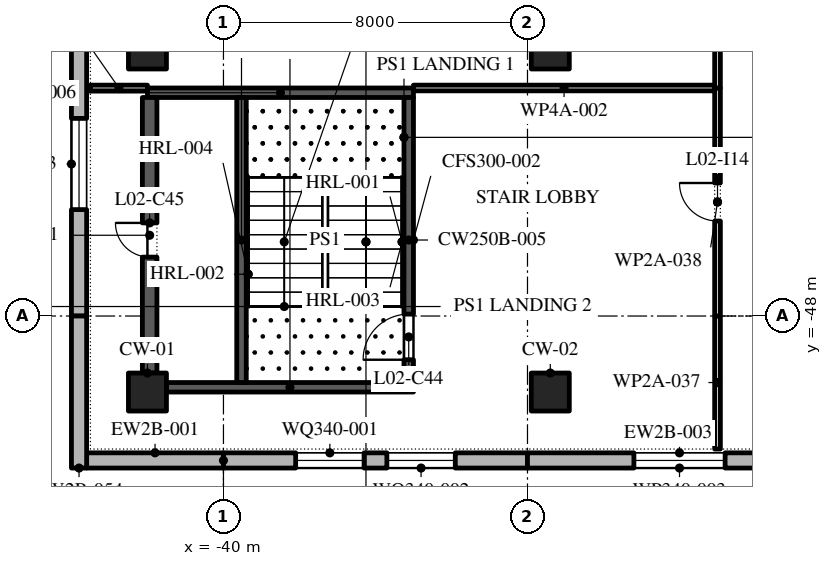
"""IFC4 building model, lengths in metres.
Left out: names, types, materials, properties, quantities, classifications, styles, units other than length and angle.
Written with IfcOpenShell. Run it as: python <this file> out.ifc"""

import sys

from ifc_helpers import new_model, si_unit, direction, frame, frame_2d, origin, origin_2d, place, context, subcontext, project, spatial, polyline, rectangle, outline, extrude, element, fill, save


model = new_model("IFC4")
c1 = context("Model", 3, precision=1e-05, world=origin(), true_north=direction((0.0, 1.0)))
c2 = subcontext(c1, "Body", "Model", "MODEL_VIEW")
j1 = project(units=[si_unit("LENGTHUNIT", "METRE"), si_unit("PLANEANGLEUNIT", "RADIAN")], contexts=[c1])
p1 = place(None, origin())
s1 = spatial("IfcSite", under=j1, at=p1, CompositionType="ELEMENT")
p2 = place(p1, origin())
s2 = spatial("IfcBuilding", under=s1, at=p2, CompositionType="ELEMENT")
p3 = place(p2, frame((0.0, 0.0, 14.0)))
s3 = spatial("IfcBuildingStorey", under=s2, at=p3, CompositionType="ELEMENT", Elevation=14.0)
for number, where, z_axis, x_axis in (
    (1, (-42.0, -50.0, 0.0), (0.0, 0.0, 1.0), (1.0, 0.0, 0.0)),
    (2, (-31.4, -50.0, 0.0), (0.0, 0.0, 1.0), (1.0, 0.0, 0.0)),
    (3, (-42.0, -41.0, 0.0), (0.0, 0.0, 1.0), (1.0, 0.0, 0.0)),
    (4, (-31.4, -41.0, 0.0), (0.0, 0.0, 1.0), (1.0, 0.0, 0.0)),
):
    element("IfcColumn", number, at=place(p3, frame(where, z_axis=z_axis, x_axis=x_axis)), inside=s3, PredefinedType="COLUMN", context=c2, shape_type="SweptSolid", body=[
        extrude(rectangle(XDim=1.0, YDim=1.0, at=origin_2d()), origin(), (0.0, 0.0, 1.0), 5.2),
    ])
p4 = place(p3, frame((-43.6, -51.8, 0.0), z_axis=(0.0, 0.0, 1.0), x_axis=(1.0, 0.0, 0.0)))
e5 = element("IfcWall", 5, at=p4, inside=s3, PredefinedType="STANDARD", context=c2, shape_type="SweptSolid", body=[
    extrude(rectangle(XDim=3.6, YDim=0.4, at=frame_2d((1.8, 0.0))), origin(), (0.0, 0.0, 1.0), 4.9),
])
p5 = place(p3, frame((-40.0, -51.8, 0.0), z_axis=(0.0, 0.0, 1.0), x_axis=(1.0, 0.0, 0.0)))
e6 = element("IfcWall", 6, at=p5, inside=s3, PredefinedType="STANDARD", context=c2, shape_type="SweptSolid", body=[
    extrude(rectangle(XDim=8.0, YDim=0.4, at=frame_2d((4.0, 0.0))), origin(), (0.0, 0.0, 1.0), 4.9),
])
p6 = place(p5, frame((1.9, 0.0, 0.9)))
e7 = element("IfcOpeningElement", 7, at=p6, cuts=e6, PredefinedType="OPENING", context=c2, shape_type="SweptSolid", body=[
    extrude(outline(polyline([(0.0, 0.0), (1.8, 0.0), (1.8, 1.841), (1.785, 2.076), (1.739, 2.307), (1.663, 2.53), (1.559, 2.741), (1.428, 2.937), (1.273, 3.114), (1.096, 3.269), (0.9, 3.4), (0.704, 3.269), (0.527, 3.114), (0.372, 2.937), (0.241, 2.741), (0.137, 2.53), (0.061, 2.307), (0.015, 2.076), (0.0, 1.841), (0.0, 0.0)])), frame((0.0, 0.21, 0.0), z_axis=(0.0, -1.0, 0.0), x_axis=(1.0, 0.0, 0.0)), (0.0, 0.0, 1.0), 0.42),
])
p7 = place(p5, frame((4.3, 0.0, 0.9)))
e8 = element("IfcOpeningElement", 8, at=p7, cuts=e6, PredefinedType="OPENING", context=c2, shape_type="SweptSolid", body=[
    extrude(outline(polyline([(0.0, 0.0), (1.8, 0.0), (1.8, 1.841), (1.785, 2.076), (1.739, 2.307), (1.663, 2.53), (1.559, 2.741), (1.428, 2.937), (1.273, 3.114), (1.096, 3.269), (0.9, 3.4), (0.704, 3.269), (0.527, 3.114), (0.372, 2.937), (0.241, 2.741), (0.137, 2.53), (0.061, 2.307), (0.015, 2.076), (0.0, 1.841), (0.0, 0.0)])), frame((0.0, 0.21, 0.0), z_axis=(0.0, -1.0, 0.0), x_axis=(1.0, 0.0, 0.0)), (0.0, 0.0, 1.0), 0.42),
])
p8 = place(p3, frame((-32.0, -51.8, 0.0), z_axis=(0.0, 0.0, 1.0), x_axis=(1.0, 0.0, 0.0)))
e9 = element("IfcWall", 9, at=p8, inside=s3, PredefinedType="STANDARD", context=c2, shape_type="SweptSolid", body=[
    extrude(rectangle(XDim=8.0, YDim=0.4, at=frame_2d((4.0, 0.0))), origin(), (0.0, 0.0, 1.0), 4.9),
])
p9 = place(p8, frame((2.8, 0.0, 0.9)))
e10 = element("IfcOpeningElement", 10, at=p9, cuts=e9, PredefinedType="OPENING", context=c2, shape_type="SweptSolid", body=[
    extrude(outline(polyline([(0.0, 0.0), (2.4, 0.0), (2.4, 1.7), (2.379, 1.976), (2.315, 2.246), (2.212, 2.502), (2.07, 2.74), (1.893, 2.954), (1.686, 3.137), (1.453, 3.287), (1.2, 3.4), (0.947, 3.287), (0.714, 3.137), (0.507, 2.954), (0.33, 2.74), (0.188, 2.502), (0.084, 2.246), (0.021, 1.976), (0.0, 1.7), (0.0, 0.0)])), frame((0.0, 0.21, 0.0), z_axis=(0.0, -1.0, 0.0), x_axis=(1.0, 0.0, 0.0)), (0.0, 0.0, 1.0), 0.42),
])
p10 = place(p3, frame((-43.8, -40.0, 0.0), z_axis=(0.0, 0.0, 1.0), x_axis=(0.0, -1.0, 0.0)))
e11 = element("IfcWall", 11, at=p10, inside=s3, PredefinedType="STANDARD", context=c2, shape_type="SweptSolid", body=[
    extrude(rectangle(XDim=8.0, YDim=0.4, at=frame_2d((4.0, 0.0))), origin(), (0.0, 0.0, 1.0), 4.9),
])
p11 = place(p10, frame((2.8, 0.0, 0.9)))
e12 = element("IfcOpeningElement", 12, at=p11, cuts=e11, PredefinedType="OPENING", context=c2, shape_type="SweptSolid", body=[
    extrude(outline(polyline([(0.0, 0.0), (2.4, 0.0), (2.4, 1.7), (2.379, 1.976), (2.315, 2.246), (2.212, 2.502), (2.07, 2.74), (1.893, 2.954), (1.686, 3.137), (1.453, 3.287), (1.2, 3.4), (0.947, 3.287), (0.714, 3.137), (0.507, 2.954), (0.33, 2.74), (0.188, 2.502), (0.084, 2.246), (0.021, 1.976), (0.0, 1.7), (0.0, 0.0)])), frame((0.0, 0.21, 0.0), z_axis=(0.0, -1.0, 0.0), x_axis=(1.0, 0.0, 0.0)), (0.0, 0.0, 1.0), 0.42),
])
p12 = place(p3, frame((-43.8, -48.0, 0.0), z_axis=(0.0, 0.0, 1.0), x_axis=(0.0, -1.0, 0.0)))
e13 = element("IfcWall", 13, at=p12, inside=s3, PredefinedType="STANDARD", context=c2, shape_type="SweptSolid", body=[
    extrude(rectangle(XDim=4.0, YDim=0.4, at=frame_2d((2.0, 0.0))), origin(), (0.0, 0.0, 1.0), 4.9),
])
p13 = place(p3, frame((-41.5, -49.875, 0.0), z_axis=(0.0, 0.0, 1.0), x_axis=(1.0, 0.0, 0.0)))
e14 = element("IfcWall", 14, at=p13, inside=s3, PredefinedType="SHEAR", context=c2, shape_type="SweptSolid", body=[
    extrude(rectangle(XDim=6.5, YDim=0.25, at=frame_2d((3.25, 0.0))), origin(), (0.0, 0.0, 1.0), 4.9),
])
p14 = place(p3, frame((-42.0, -42.125, 0.0), z_axis=(0.0, 0.0, 1.0), x_axis=(1.0, 0.0, 0.0)))
e15 = element("IfcWall", 15, at=p14, inside=s3, PredefinedType="SHEAR", context=c2, shape_type="SweptSolid", body=[
    extrude(rectangle(XDim=7.0, YDim=0.25, at=frame_2d((3.5, 0.0))), origin(), (0.0, 0.0, 1.0), 4.9),
])
p15 = place(p3, frame((-41.942, -49.5, 0.0), z_axis=(0.0, 0.0, 1.0), x_axis=(0.0, 1.0, 0.0)))
e16 = element("IfcWall", 16, at=p15, inside=s3, PredefinedType="SHEAR", context=c2, shape_type="SweptSolid", body=[
    extrude(rectangle(XDim=7.25, YDim=0.384, at=frame_2d((3.625, 0.0))), origin(), (0.0, 0.0, 1.0), 4.9),
])
p16 = place(p15, frame((3.05, 0.0, 0.0)))
e17 = element("IfcOpeningElement", 17, at=p16, cuts=e16, PredefinedType="OPENING", context=c2, shape_type="SweptSolid", body=[
    extrude(rectangle(XDim=0.9, YDim=2.1, at=frame_2d((0.45, 1.05))), frame((0.0, 0.202, 0.0), z_axis=(0.0, -1.0, 0.0), x_axis=(1.0, 0.0, 0.0)), (0.0, 0.0, 1.0), 0.404),
])
p17 = place(p3, frame((-35.125, -49.75, 0.0), z_axis=(0.0, 0.0, 1.0), x_axis=(0.0, 1.0, 0.0)))
e18 = element("IfcWall", 18, at=p17, inside=s3, PredefinedType="SHEAR", context=c2, shape_type="SweptSolid", body=[
    extrude(rectangle(XDim=7.5, YDim=0.25, at=frame_2d((3.75, 0.0))), origin(), (0.0, 0.0, 1.0), 4.9),
])
p18 = place(p17, frame((0.6, 0.0, 0.0)))
e19 = element("IfcOpeningElement", 19, at=p18, cuts=e18, PredefinedType="OPENING", context=c2, shape_type="SweptSolid", body=[
    extrude(rectangle(XDim=1.2, YDim=2.1, at=frame_2d((0.6, 1.05))), frame((0.0, 0.135, 0.0), z_axis=(0.0, -1.0, 0.0), x_axis=(1.0, 0.0, 0.0)), (0.0, 0.0, 1.0), 0.27),
])
p19 = place(p3, frame((-39.525, -49.75, 0.0), z_axis=(0.0, 0.0, 1.0), x_axis=(0.0, 1.0, 0.0)))
e20 = element("IfcWall", 20, at=p19, inside=s3, PredefinedType="SHEAR", context=c2, shape_type="SweptSolid", body=[
    extrude(rectangle(XDim=7.5, YDim=0.25, at=frame_2d((3.75, 0.0))), origin(), (0.0, 0.0, 1.0), 4.9),
])
p20 = place(p3, frame((-43.5, -42.0, 0.0), z_axis=(0.0, 0.0, 1.0), x_axis=(1.0, 0.0, 0.0)))
e21 = element("IfcWall", 21, at=p20, inside=s3, PredefinedType="PARTITIONING", context=c2, shape_type="SweptSolid", body=[
    extrude(rectangle(XDim=1.5, YDim=0.15, at=frame_2d((0.75, 0.0))), origin(), (0.0, 0.0, 1.0), 4.9),
])
p21 = place(p3, frame((-35.0, -42.0, 0.0), z_axis=(0.0, 0.0, 1.0), x_axis=(1.0, 0.0, 0.0)))
e22 = element("IfcWall", 22, at=p21, inside=s3, PredefinedType="PARTITIONING", context=c2, shape_type="SweptSolid", body=[
    extrude(rectangle(XDim=7.925, YDim=0.15, at=frame_2d((3.962, 0.0))), origin(), (0.0, 0.0, 1.0), 4.9),
])
p22 = place(p3, frame((-27.0, -51.5, 0.0), z_axis=(0.0, 0.0, 1.0), x_axis=(0.0, 1.0, 0.0)))
e23 = element("IfcWall", 23, at=p22, inside=s3, PredefinedType="PARTITIONING", context=c2, shape_type="SweptSolid", body=[
    extrude(rectangle(XDim=3.5, YDim=0.15, at=frame_2d((1.75, 0.0))), origin(), (0.0, 0.0, 1.0), 4.9),
])
p23 = place(p3, frame((-27.0, -48.0, 0.0), z_axis=(0.0, 0.0, 1.0), x_axis=(0.0, 1.0, 0.0)))
e24 = element("IfcWall", 24, at=p23, inside=s3, PredefinedType="PARTITIONING", context=c2, shape_type="SweptSolid", body=[
    extrude(rectangle(XDim=6.0, YDim=0.15, at=frame_2d((3.0, 0.0))), origin(), (0.0, 0.0, 1.0), 4.9),
])
p24 = place(p23, frame((2.5, 0.0, 0.0)))
e25 = element("IfcOpeningElement", 25, at=p24, cuts=e24, PredefinedType="OPENING", context=c2, shape_type="SweptSolid", body=[
    extrude(rectangle(XDim=1.0, YDim=2.1, at=frame_2d((0.5, 1.05))), frame((0.0, 0.085, 0.0), z_axis=(0.0, -1.0, 0.0), x_axis=(1.0, 0.0, 0.0)), (0.0, 0.0, 1.0), 0.17),
])
p25 = place(p3, frame((-27.0, -42.0, 0.0), z_axis=(0.0, 0.0, 1.0), x_axis=(0.0, 1.0, 0.0)))
e26 = element("IfcWall", 26, at=p25, inside=s3, PredefinedType="PARTITIONING", context=c2, shape_type="SweptSolid", body=[
    extrude(rectangle(XDim=10.0, YDim=0.15, at=frame_2d((5.0, 0.0))), origin(), (0.0, 0.0, 1.0), 4.9),
])
p26 = place(p25, frame((4.1, 0.0, 0.0)))
e27 = element("IfcOpeningElement", 27, at=p26, cuts=e26, PredefinedType="OPENING", context=c2, shape_type="SweptSolid", body=[
    extrude(rectangle(XDim=1.8, YDim=2.1, at=frame_2d((0.9, 1.05))), frame((0.0, 0.085, 0.0), z_axis=(0.0, -1.0, 0.0), x_axis=(1.0, 0.0, 0.0)), (0.0, 0.0, 1.0), 0.17),
])
p27 = place(p6, origin())
e28 = element("IfcWindow", 28, at=p27, inside=s3, PartitioningType="DOUBLE_PANEL_VERTICAL", PredefinedType="WINDOW", context=c2, shape_type="SweptSolid", body=[
    extrude(outline(polyline([(0.0, 0.0), (1.8, 0.0), (1.8, 1.841), (1.785, 2.076), (1.739, 2.307), (1.663, 2.53), (1.559, 2.741), (1.428, 2.937), (1.273, 3.114), (1.096, 3.269), (0.9, 3.4), (0.704, 3.269), (0.527, 3.114), (0.372, 2.937), (0.241, 2.741), (0.137, 2.53), (0.061, 2.307), (0.015, 2.076), (0.0, 1.841), (0.0, 0.0)])), frame((0.0, 0.03, 0.0), z_axis=(0.0, -1.0, 0.0), x_axis=(1.0, 0.0, 0.0)), (0.0, 0.0, 1.0), 0.06),
])
fill(e7, e28)
p28 = place(p7, origin())
e29 = element("IfcWindow", 29, at=p28, inside=s3, PartitioningType="DOUBLE_PANEL_VERTICAL", PredefinedType="WINDOW", context=c2, shape_type="SweptSolid", body=[
    extrude(outline(polyline([(0.0, 0.0), (1.8, 0.0), (1.8, 1.841), (1.785, 2.076), (1.739, 2.307), (1.663, 2.53), (1.559, 2.741), (1.428, 2.937), (1.273, 3.114), (1.096, 3.269), (0.9, 3.4), (0.704, 3.269), (0.527, 3.114), (0.372, 2.937), (0.241, 2.741), (0.137, 2.53), (0.061, 2.307), (0.015, 2.076), (0.0, 1.841), (0.0, 0.0)])), frame((0.0, 0.03, 0.0), z_axis=(0.0, -1.0, 0.0), x_axis=(1.0, 0.0, 0.0)), (0.0, 0.0, 1.0), 0.06),
])
fill(e8, e29)
p29 = place(p9, origin())
e30 = element("IfcWindow", 30, at=p29, inside=s3, PartitioningType="DOUBLE_PANEL_VERTICAL", PredefinedType="WINDOW", context=c2, shape_type="SweptSolid", body=[
    extrude(outline(polyline([(0.0, 0.0), (2.4, 0.0), (2.4, 1.7), (2.379, 1.976), (2.315, 2.246), (2.212, 2.502), (2.07, 2.74), (1.893, 2.954), (1.686, 3.137), (1.453, 3.287), (1.2, 3.4), (0.947, 3.287), (0.714, 3.137), (0.507, 2.954), (0.33, 2.74), (0.188, 2.502), (0.084, 2.246), (0.021, 1.976), (0.0, 1.7), (0.0, 0.0)])), frame((0.0, 0.03, 0.0), z_axis=(0.0, -1.0, 0.0), x_axis=(1.0, 0.0, 0.0)), (0.0, 0.0, 1.0), 0.06),
])
fill(e10, e30)
p30 = place(p11, origin())
e31 = element("IfcWindow", 31, at=p30, inside=s3, PartitioningType="DOUBLE_PANEL_VERTICAL", PredefinedType="WINDOW", context=c2, shape_type="SweptSolid", body=[
    extrude(outline(polyline([(0.0, 0.0), (2.4, 0.0), (2.4, 1.7), (2.379, 1.976), (2.315, 2.246), (2.212, 2.502), (2.07, 2.74), (1.893, 2.954), (1.686, 3.137), (1.453, 3.287), (1.2, 3.4), (0.947, 3.287), (0.714, 3.137), (0.507, 2.954), (0.33, 2.74), (0.188, 2.502), (0.084, 2.246), (0.021, 1.976), (0.0, 1.7), (0.0, 0.0)])), frame((0.0, 0.03, 0.0), z_axis=(0.0, -1.0, 0.0), x_axis=(1.0, 0.0, 0.0)), (0.0, 0.0, 1.0), 0.06),
])
fill(e12, e31)
p31 = place(p18, origin())
e32 = element("IfcDoor", 32, at=p31, inside=s3, OperationType="SINGLE_SWING_RIGHT", PredefinedType="DOOR", context=c2, shape_type="SweptSolid", body=[
    extrude(rectangle(XDim=1.2, YDim=2.1, at=frame_2d((0.6, 1.05))), frame((0.0, 0.025, 0.0), z_axis=(0.0, -1.0, 0.0), x_axis=(1.0, 0.0, 0.0)), (0.0, 0.0, 1.0), 0.05),
])
fill(e19, e32)
p32 = place(p16, origin())
e33 = element("IfcDoor", 33, at=p32, inside=s3, OperationType="SINGLE_SWING_LEFT", PredefinedType="DOOR", context=c2, shape_type="SweptSolid", body=[
    extrude(rectangle(XDim=0.9, YDim=2.1, at=frame_2d((0.45, 1.05))), frame((0.0, -0.142, 0.0), z_axis=(0.0, -1.0, 0.0), x_axis=(1.0, 0.0, 0.0)), (0.0, 0.0, 1.0), 0.05),
])
fill(e17, e33)
p33 = place(p24, origin())
e34 = element("IfcDoor", 34, at=p33, inside=s3, OperationType="SINGLE_SWING_LEFT", PredefinedType="DOOR", context=c2, shape_type="SweptSolid", body=[
    extrude(rectangle(XDim=1.0, YDim=2.1, at=frame_2d((0.5, 1.05))), frame((0.0, 0.025, 0.0), z_axis=(0.0, -1.0, 0.0), x_axis=(1.0, 0.0, 0.0)), (0.0, 0.0, 1.0), 0.05),
])
fill(e25, e34)
save(model, sys.argv[1])
